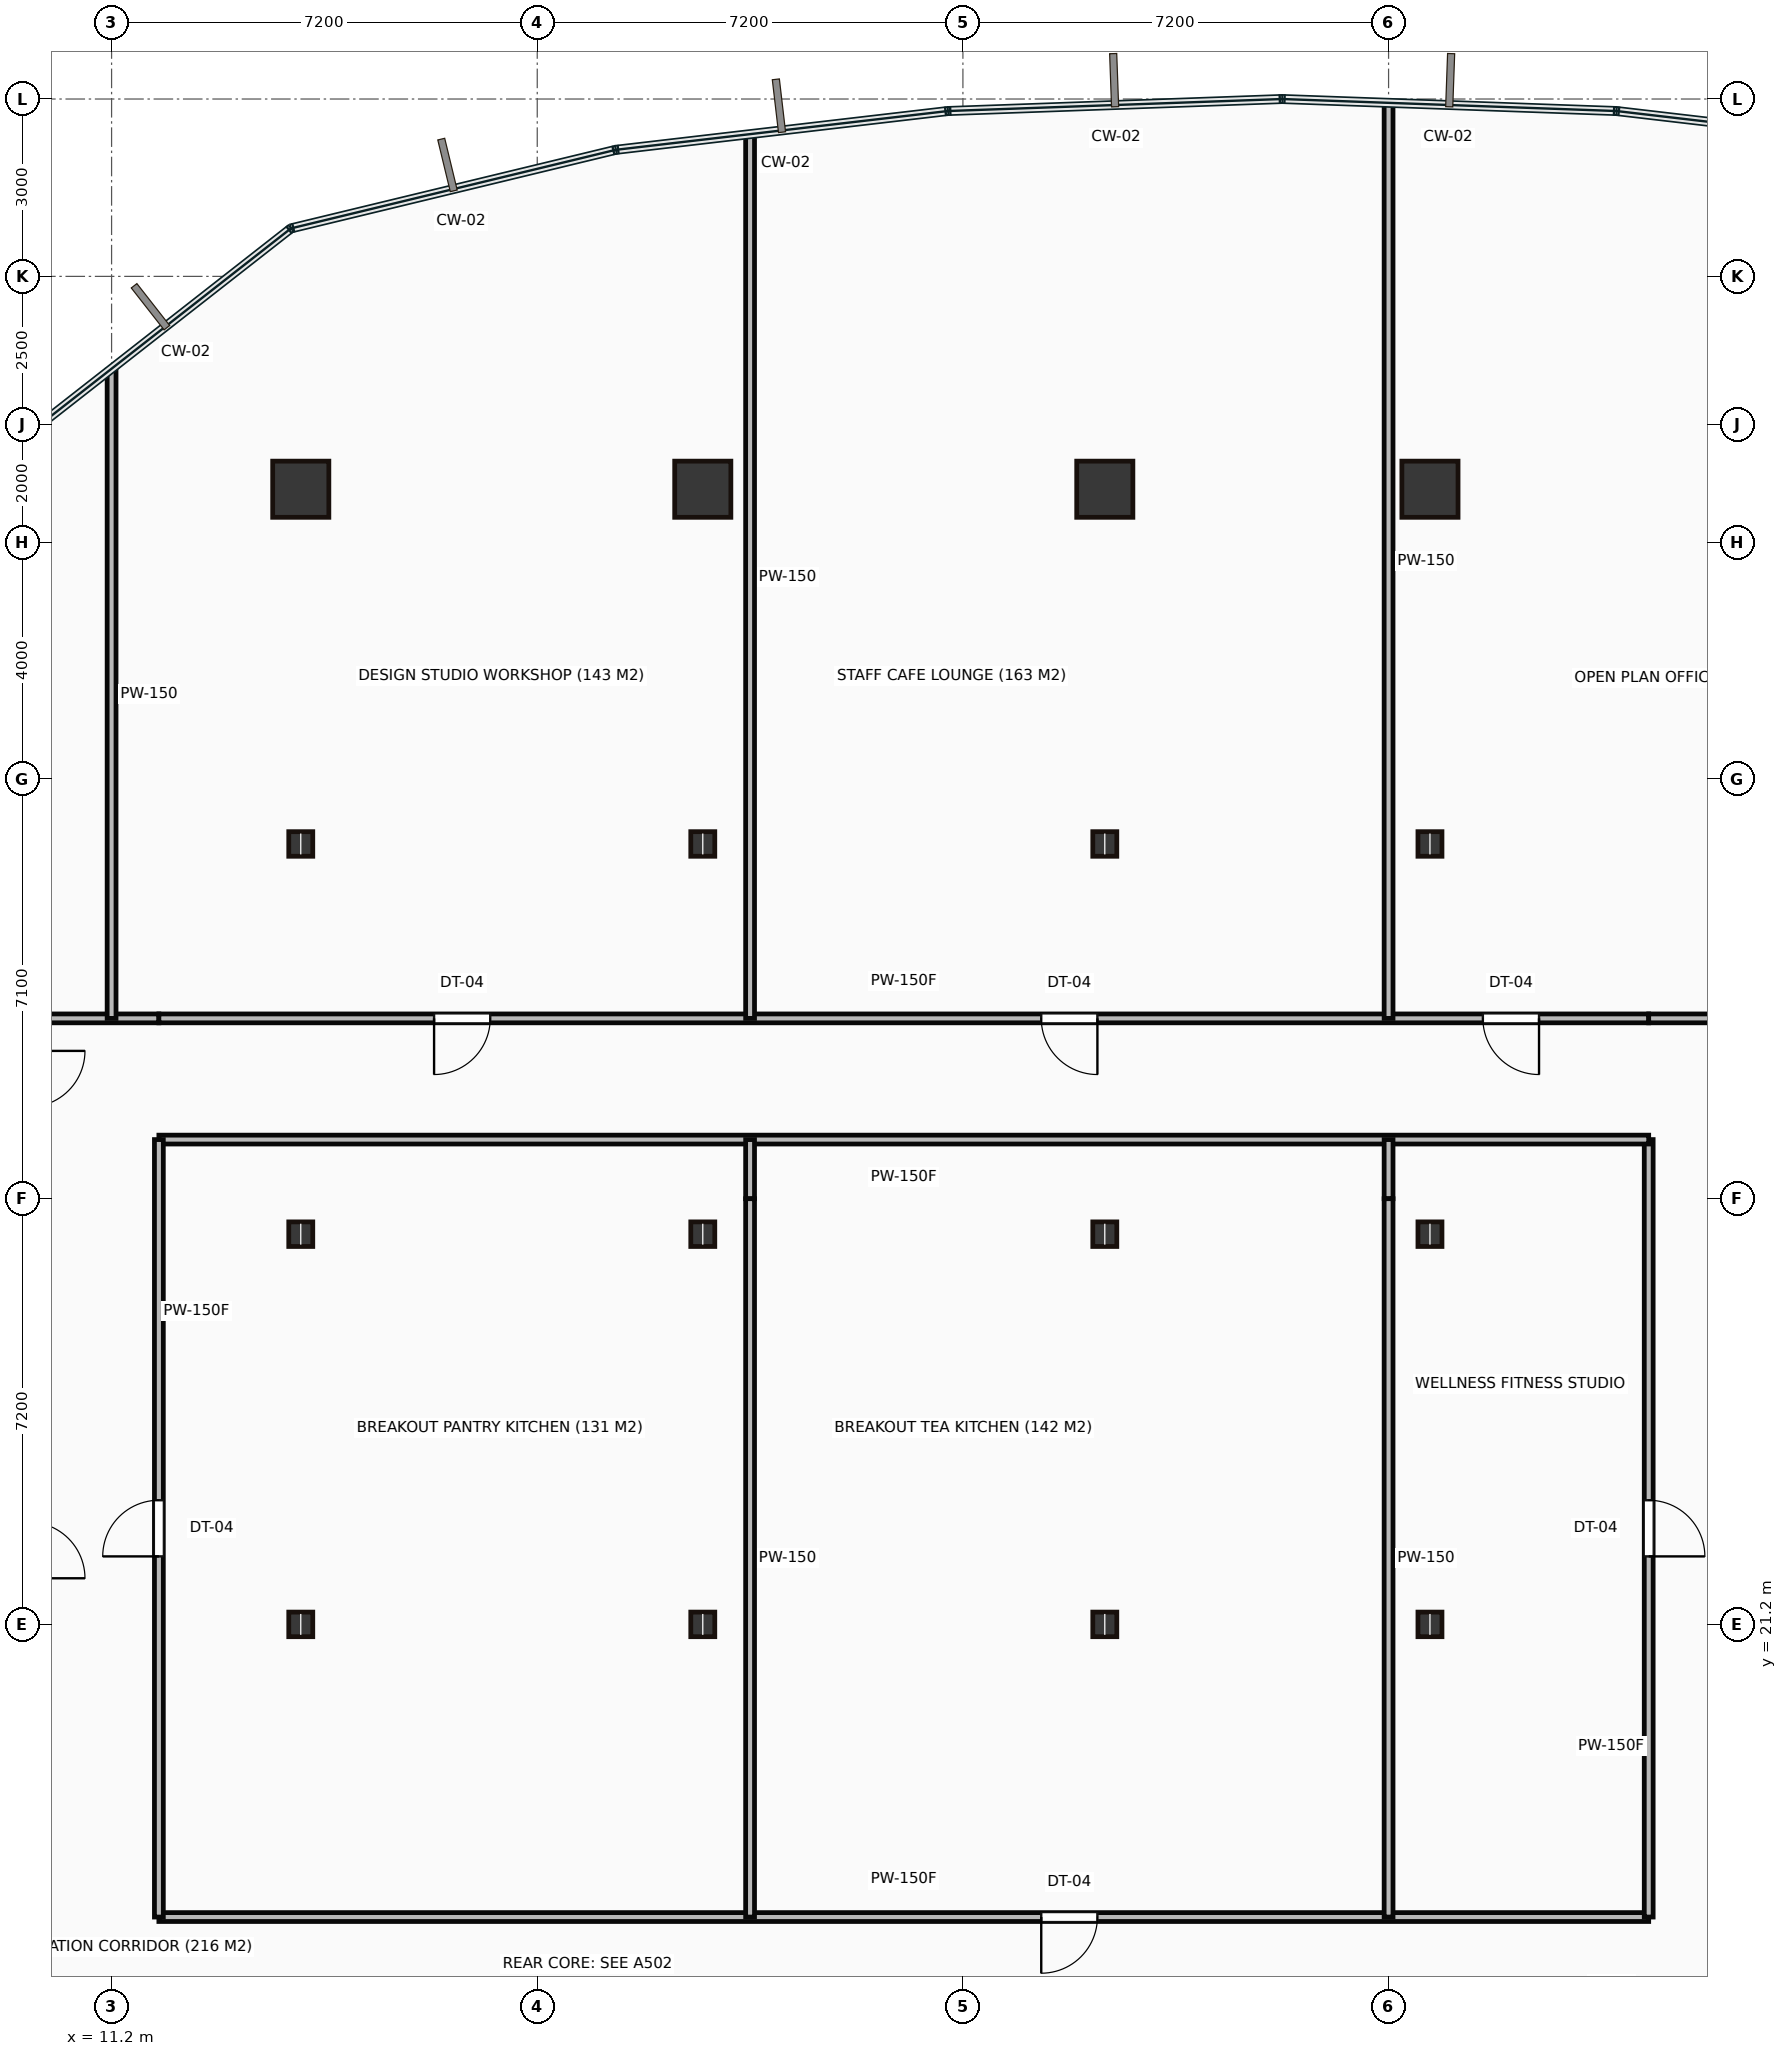
"""IFC4 building model, lengths in metres.
Left out: names, types, materials, properties, quantities, classifications, styles, units other than length and angle.
Written with IfcOpenShell. Run it as: python <this file> out.ifc"""

import sys

from ifc_helpers import new_model, si_unit, direction, frame, frame_2d, origin, origin_2d, place, context, subcontext, project, spatial, rectangle, hollow_rectangle, i_section, extrude, source, transform, mapped, element, fill, save


model = new_model("IFC4")
c1 = context("Model", 3, precision=1e-05, world=origin(), true_north=direction((0.0, 1.0)))
c2 = subcontext(c1, "Body", "Model", "MODEL_VIEW")
j1 = project(units=[si_unit("LENGTHUNIT", "METRE"), si_unit("PLANEANGLEUNIT", "RADIAN")], contexts=[c1])
p1 = place(None, origin())
s1 = spatial("IfcSite", under=j1, at=p1, CompositionType="ELEMENT")
p2 = place(p1, origin())
s2 = spatial("IfcBuilding", under=s1, at=p2, CompositionType="ELEMENT")
p3 = place(p2, frame((0.0, 0.0, 36.15)))
s3 = spatial("IfcBuildingStorey", under=s2, at=p3, CompositionType="ELEMENT", Elevation=36.15)
m1 = source(origin(), c2, "Body", "SweptSolid", [
    extrude(i_section(OverallWidth=0.406, OverallDepth=0.416, WebThickness=0.03, FlangeThickness=0.048, at=origin_2d()), origin(), (0.0, 0.0, 1.0), 3.65),
])
for number, where, z_axis, x_axis in (
    (1, (14.4, 21.2, 0.0), (0.0, 0.0, 1.0), (1.0, 0.0, 0.0)),
    (2, (14.4, 27.8, 0.0), (0.0, 0.0, 1.0), (1.0, 0.0, 0.0)),
    (3, (14.4, 34.4, 0.0), (0.0, 0.0, 1.0), (1.0, 0.0, 0.0)),
):
    element("IfcColumn", number, at=place(p3, frame(where, z_axis=z_axis, x_axis=x_axis)), inside=s3, PredefinedType="COLUMN", context=c2, shape_type="MappedRepresentation", body=[
        mapped(m1, transform((0.0, 0.0, 0.0))),
    ])
m2 = source(origin(), c2, "Body", "SweptSolid", [
    extrude(hollow_rectangle(XDim=0.95, YDim=0.95, WallThickness=0.045, at=origin_2d()), origin(), (0.0, 0.0, 1.0), 3.65),
])
p4 = place(p3, frame((14.4, 40.4, 0.0), z_axis=(0.0, 0.0, 1.0), x_axis=(1.0, 0.0, 0.0)))
e4 = element("IfcColumn", 4, at=p4, inside=s3, PredefinedType="COLUMN", context=c2, shape_type="MappedRepresentation", body=[
    mapped(m2, transform((0.0, 0.0, 0.0))),
])
for number, where, z_axis, x_axis in (
    (5, (21.2, 21.2, 0.0), (0.0, 0.0, 1.0), (1.0, 0.0, 0.0)),
    (6, (21.2, 27.8, 0.0), (0.0, 0.0, 1.0), (1.0, 0.0, 0.0)),
    (7, (21.2, 34.4, 0.0), (0.0, 0.0, 1.0), (1.0, 0.0, 0.0)),
):
    element("IfcColumn", number, at=place(p3, frame(where, z_axis=z_axis, x_axis=x_axis)), inside=s3, PredefinedType="COLUMN", context=c2, shape_type="MappedRepresentation", body=[
        mapped(m1, transform((0.0, 0.0, 0.0))),
    ])
p5 = place(p3, frame((21.2, 40.4, 0.0), z_axis=(0.0, 0.0, 1.0), x_axis=(1.0, 0.0, 0.0)))
e8 = element("IfcColumn", 8, at=p5, inside=s3, PredefinedType="COLUMN", context=c2, shape_type="MappedRepresentation", body=[
    mapped(m2, transform((0.0, 0.0, 0.0))),
])
for number, where, z_axis, x_axis in (
    (9, (28.0, 21.2, 0.0), (0.0, 0.0, 1.0), (1.0, 0.0, 0.0)),
    (10, (28.0, 27.8, 0.0), (0.0, 0.0, 1.0), (1.0, 0.0, 0.0)),
    (11, (28.0, 34.4, 0.0), (0.0, 0.0, 1.0), (1.0, 0.0, 0.0)),
):
    element("IfcColumn", number, at=place(p3, frame(where, z_axis=z_axis, x_axis=x_axis)), inside=s3, PredefinedType="COLUMN", context=c2, shape_type="MappedRepresentation", body=[
        mapped(m1, transform((0.0, 0.0, 0.0))),
    ])
p6 = place(p3, frame((28.0, 40.4, 0.0), z_axis=(0.0, 0.0, 1.0), x_axis=(1.0, 0.0, 0.0)))
e12 = element("IfcColumn", 12, at=p6, inside=s3, PredefinedType="COLUMN", context=c2, shape_type="MappedRepresentation", body=[
    mapped(m2, transform((0.0, 0.0, 0.0))),
])
for number, where, z_axis, x_axis in (
    (13, (33.5, 21.2, 0.0), (0.0, 0.0, 1.0), (1.0, 0.0, 0.0)),
    (14, (33.5, 27.8, 0.0), (0.0, 0.0, 1.0), (1.0, 0.0, 0.0)),
    (15, (33.5, 34.4, 0.0), (0.0, 0.0, 1.0), (1.0, 0.0, 0.0)),
):
    element("IfcColumn", number, at=place(p3, frame(where, z_axis=z_axis, x_axis=x_axis)), inside=s3, PredefinedType="COLUMN", context=c2, shape_type="MappedRepresentation", body=[
        mapped(m1, transform((0.0, 0.0, 0.0))),
    ])
p7 = place(p3, frame((33.5, 40.4, 0.0), z_axis=(0.0, 0.0, 1.0), x_axis=(1.0, 0.0, 0.0)))
e16 = element("IfcColumn", 16, at=p7, inside=s3, PredefinedType="COLUMN", context=c2, shape_type="MappedRepresentation", body=[
    mapped(m2, transform((0.0, 0.0, 0.0))),
])
m3 = source(origin(), c2, "Body", "SweptSolid", [
    extrude(rectangle(XDim=2.2, YDim=0.15, at=frame_2d((1.1, 0.0))), origin(), (0.0, 0.0, 1.0), 3.4),
])
p8 = place(p3, frame((9.8, 31.45, 0.0), z_axis=(0.0, 0.0, 1.0), x_axis=(1.0, 0.0, 0.0)))
e17 = element("IfcWall", 17, at=p8, inside=s3, PredefinedType="PARTITIONING", context=c2, shape_type="MappedRepresentation", body=[
    mapped(m3, transform((0.0, 0.0, 0.0))),
])
m4 = source(origin(), c2, "Body", "SweptSolid", [
    extrude(rectangle(XDim=25.2, YDim=0.15, at=frame_2d((12.6, 0.0))), origin(), (0.0, 0.0, 1.0), 3.4),
])
p9 = place(p3, frame((12.0, 31.45, 0.0), z_axis=(0.0, 0.0, 1.0), x_axis=(1.0, 0.0, 0.0)))
e18 = element("IfcWall", 18, at=p9, inside=s3, PredefinedType="PARTITIONING", context=c2, shape_type="MappedRepresentation", body=[
    mapped(m4, transform((0.0, 0.0, 0.0))),
])
p10 = place(p9, frame((4.655, 0.0, 0.0)))
e19 = element("IfcOpeningElement", 19, at=p10, cuts=e18, PredefinedType="OPENING", context=c2, shape_type="SweptSolid", body=[
    extrude(rectangle(XDim=0.95, YDim=2.15, at=frame_2d((0.475, 1.075))), frame((0.0, 0.085, 0.0), z_axis=(0.0, -1.0, 0.0), x_axis=(1.0, 0.0, 0.0)), (0.0, 0.0, 1.0), 0.17),
])
p11 = place(p9, frame((14.925, 0.0, 0.0)))
e20 = element("IfcOpeningElement", 20, at=p11, cuts=e18, PredefinedType="OPENING", context=c2, shape_type="SweptSolid", body=[
    extrude(rectangle(XDim=0.95, YDim=2.15, at=frame_2d((0.475, 1.075))), frame((0.0, 0.085, 0.0), z_axis=(0.0, -1.0, 0.0), x_axis=(1.0, 0.0, 0.0)), (0.0, 0.0, 1.0), 0.17),
])
p12 = place(p9, frame((22.395, 0.0, 0.0)))
e21 = element("IfcOpeningElement", 21, at=p12, cuts=e18, PredefinedType="OPENING", context=c2, shape_type="SweptSolid", body=[
    extrude(rectangle(XDim=0.95, YDim=2.15, at=frame_2d((0.475, 1.075))), frame((0.0, 0.085, 0.0), z_axis=(0.0, -1.0, 0.0), x_axis=(1.0, 0.0, 0.0)), (0.0, 0.0, 1.0), 0.17),
])
p13 = place(p3, frame((37.2, 31.45, 0.0), z_axis=(0.0, 0.0, 1.0), x_axis=(1.0, 0.0, 0.0)))
e22 = element("IfcWall", 22, at=p13, inside=s3, PredefinedType="PARTITIONING", context=c2, shape_type="MappedRepresentation", body=[
    mapped(m3, transform((0.0, 0.0, 0.0))),
])
p14 = place(p3, frame((12.0, 16.25, 0.0), z_axis=(0.0, 0.0, 1.0), x_axis=(1.0, 0.0, 0.0)))
e23 = element("IfcWall", 23, at=p14, inside=s3, PredefinedType="PARTITIONING", context=c2, shape_type="MappedRepresentation", body=[
    mapped(m4, transform((0.0, 0.0, 0.0))),
])
p15 = place(p14, frame((14.925, 0.0, 0.0)))
e24 = element("IfcOpeningElement", 24, at=p15, cuts=e23, PredefinedType="OPENING", context=c2, shape_type="SweptSolid", body=[
    extrude(rectangle(XDim=0.95, YDim=2.15, at=frame_2d((0.475, 1.075))), frame((0.0, 0.085, 0.0), z_axis=(0.0, -1.0, 0.0), x_axis=(1.0, 0.0, 0.0)), (0.0, 0.0, 1.0), 0.17),
])
m5 = source(origin(), c2, "Body", "SweptSolid", [
    extrude(rectangle(XDim=13.15, YDim=0.15, at=frame_2d((6.575, 0.0))), origin(), (0.0, 0.0, 1.0), 3.4),
])
p16 = place(p3, frame((37.2, 16.25, 0.0), z_axis=(0.0, 0.0, 1.0), x_axis=(0.0, 1.0, 0.0)))
e25 = element("IfcWall", 25, at=p16, inside=s3, PredefinedType="PARTITIONING", context=c2, shape_type="MappedRepresentation", body=[
    mapped(m5, transform((0.0, 0.0, 0.0))),
])
p17 = place(p16, frame((6.1, 0.0, 0.0)))
e26 = element("IfcOpeningElement", 26, at=p17, cuts=e25, PredefinedType="OPENING", context=c2, shape_type="SweptSolid", body=[
    extrude(rectangle(XDim=0.95, YDim=2.15, at=frame_2d((0.475, 1.075))), frame((0.0, 0.085, 0.0), z_axis=(0.0, -1.0, 0.0), x_axis=(1.0, 0.0, 0.0)), (0.0, 0.0, 1.0), 0.17),
])
p18 = place(p3, frame((37.2, 29.4, 0.0), z_axis=(0.0, 0.0, 1.0), x_axis=(-1.0, 0.0, 0.0)))
e27 = element("IfcWall", 27, at=p18, inside=s3, PredefinedType="PARTITIONING", context=c2, shape_type="MappedRepresentation", body=[
    mapped(m4, transform((0.0, 0.0, 0.0))),
])
p19 = place(p3, frame((12.0, 29.4, 0.0), z_axis=(0.0, 0.0, 1.0), x_axis=(0.0, -1.0, 0.0)))
e28 = element("IfcWall", 28, at=p19, inside=s3, PredefinedType="PARTITIONING", context=c2, shape_type="MappedRepresentation", body=[
    mapped(m5, transform((0.0, 0.0, 0.0))),
])
p20 = place(p19, frame((6.1, 0.0, 0.0)))
e29 = element("IfcOpeningElement", 29, at=p20, cuts=e28, PredefinedType="OPENING", context=c2, shape_type="SweptSolid", body=[
    extrude(rectangle(XDim=0.95, YDim=2.15, at=frame_2d((0.475, 1.075))), frame((0.0, 0.085, 0.0), z_axis=(0.0, -1.0, 0.0), x_axis=(1.0, 0.0, 0.0)), (0.0, 0.0, 1.0), 0.17),
])
m6 = source(origin(), c2, "Body", "SweptSolid", [
    extrude(rectangle(XDim=10.963, YDim=0.15, at=frame_2d((5.482, 0.0))), origin(), (0.0, 0.0, 1.0), 3.4),
])
p21 = place(p3, frame((11.2, 42.413, 0.0), z_axis=(0.0, 0.0, 1.0), x_axis=(0.0, -1.0, 0.0)))
e30 = element("IfcWall", 30, at=p21, inside=s3, PredefinedType="PARTITIONING", context=c2, shape_type="MappedRepresentation", body=[
    mapped(m6, transform((0.0, 0.0, 0.0))),
])
m7 = source(origin(), c2, "Body", "SweptSolid", [
    extrude(rectangle(XDim=1.0, YDim=0.15, at=frame_2d((0.5, 0.0))), origin(), (0.0, 0.0, 1.0), 3.4),
])
p22 = place(p3, frame((22.0, 29.4, 0.0), z_axis=(0.0, 0.0, 1.0), x_axis=(0.0, -1.0, 0.0)))
e31 = element("IfcWall", 31, at=p22, inside=s3, PredefinedType="PARTITIONING", context=c2, shape_type="MappedRepresentation", body=[
    mapped(m7, transform((0.0, 0.0, 0.0))),
])
m8 = source(origin(), c2, "Body", "SweptSolid", [
    extrude(rectangle(XDim=12.15, YDim=0.15, at=frame_2d((6.075, 0.0))), origin(), (0.0, 0.0, 1.0), 3.4),
])
p23 = place(p3, frame((22.0, 28.4, 0.0), z_axis=(0.0, 0.0, 1.0), x_axis=(0.0, -1.0, 0.0)))
e32 = element("IfcWall", 32, at=p23, inside=s3, PredefinedType="PARTITIONING", context=c2, shape_type="MappedRepresentation", body=[
    mapped(m8, transform((0.0, 0.0, 0.0))),
])
m9 = source(origin(), c2, "Body", "SweptSolid", [
    extrude(rectangle(XDim=14.936, YDim=0.15, at=frame_2d((7.468, 0.0))), origin(), (0.0, 0.0, 1.0), 3.4),
])
p24 = place(p3, frame((22.0, 46.386, 0.0), z_axis=(0.0, 0.0, 1.0), x_axis=(0.0, -1.0, 0.0)))
e33 = element("IfcWall", 33, at=p24, inside=s3, PredefinedType="PARTITIONING", context=c2, shape_type="MappedRepresentation", body=[
    mapped(m9, transform((0.0, 0.0, 0.0))),
])
p25 = place(p3, frame((32.8, 29.4, 0.0), z_axis=(0.0, 0.0, 1.0), x_axis=(0.0, -1.0, 0.0)))
e34 = element("IfcWall", 34, at=p25, inside=s3, PredefinedType="PARTITIONING", context=c2, shape_type="MappedRepresentation", body=[
    mapped(m7, transform((0.0, 0.0, 0.0))),
])
p26 = place(p3, frame((32.8, 28.4, 0.0), z_axis=(0.0, 0.0, 1.0), x_axis=(0.0, -1.0, 0.0)))
e35 = element("IfcWall", 35, at=p26, inside=s3, PredefinedType="PARTITIONING", context=c2, shape_type="MappedRepresentation", body=[
    mapped(m8, transform((0.0, 0.0, 0.0))),
])
m10 = source(origin(), c2, "Body", "SweptSolid", [
    extrude(rectangle(XDim=15.465, YDim=0.15, at=frame_2d((7.733, 0.0))), origin(), (0.0, 0.0, 1.0), 3.4),
])
p27 = place(p3, frame((32.8, 46.915, 0.0), z_axis=(0.0, 0.0, 1.0), x_axis=(0.0, -1.0, 0.0)))
e36 = element("IfcWall", 36, at=p27, inside=s3, PredefinedType="PARTITIONING", context=c2, shape_type="MappedRepresentation", body=[
    mapped(m10, transform((0.0, 0.0, 0.0))),
])
m11 = source(origin(), c2, "Body", "SweptSolid", [
    extrude(rectangle(XDim=0.95, YDim=2.15, at=frame_2d((0.475, 1.075))), frame((0.0, 0.025, 0.0), z_axis=(0.0, -1.0, 0.0), x_axis=(1.0, 0.0, 0.0)), (0.0, 0.0, 1.0), 0.05),
])
p28 = place(p10, origin())
e37 = element("IfcDoor", 37, at=p28, inside=s3, OperationType="SINGLE_SWING_LEFT", PredefinedType="DOOR", context=c2, shape_type="MappedRepresentation", body=[
    mapped(m11, transform((0.0, 0.0, 0.0))),
])
fill(e19, e37)
p29 = place(p20, origin())
e38 = element("IfcDoor", 38, at=p29, inside=s3, OperationType="SINGLE_SWING_RIGHT", PredefinedType="DOOR", context=c2, shape_type="MappedRepresentation", body=[
    mapped(m11, transform((0.0, 0.0, 0.0))),
])
fill(e29, e38)
p30 = place(p15, origin())
e39 = element("IfcDoor", 39, at=p30, inside=s3, OperationType="SINGLE_SWING_LEFT", PredefinedType="DOOR", context=c2, shape_type="MappedRepresentation", body=[
    mapped(m11, transform((0.0, 0.0, 0.0))),
])
fill(e24, e39)
p31 = place(p11, origin())
e40 = element("IfcDoor", 40, at=p31, inside=s3, OperationType="SINGLE_SWING_RIGHT", PredefinedType="DOOR", context=c2, shape_type="MappedRepresentation", body=[
    mapped(m11, transform((0.0, 0.0, 0.0))),
])
fill(e20, e40)
p32 = place(p17, origin())
e41 = element("IfcDoor", 41, at=p32, inside=s3, OperationType="SINGLE_SWING_LEFT", PredefinedType="DOOR", context=c2, shape_type="MappedRepresentation", body=[
    mapped(m11, transform((0.0, 0.0, 0.0))),
])
fill(e26, e41)
p33 = place(p12, origin())
e42 = element("IfcDoor", 42, at=p33, inside=s3, OperationType="SINGLE_SWING_RIGHT", PredefinedType="DOOR", context=c2, shape_type="MappedRepresentation", body=[
    mapped(m11, transform((0.0, 0.0, 0.0))),
])
fill(e21, e42)
save(model, sys.argv[1])
